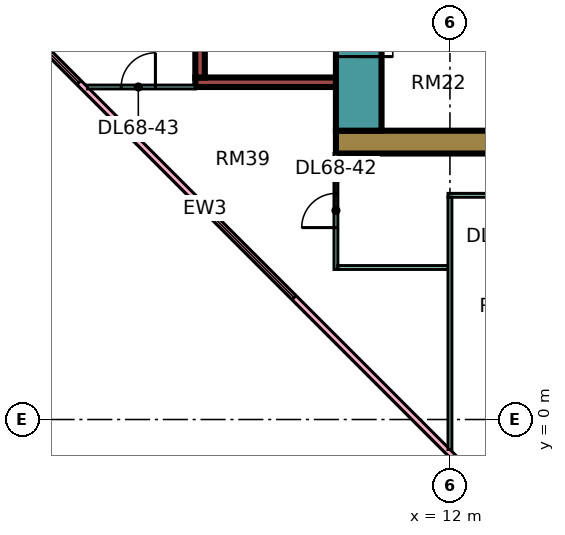
"""IFC4 building model, lengths in metres.
Left out: names, types, materials, properties, quantities, classifications, styles, units other than length and angle.
Written with IfcOpenShell. Run it as: python <this file> out.ifc"""

import sys

from ifc_helpers import new_model, si_unit, direction, frame, frame_2d, origin, place, context, subcontext, project, spatial, rectangle, extrude, element, fill, save


model = new_model("IFC4")
c1 = context("Model", 3, precision=1e-05, world=origin(), true_north=direction((0.0, 1.0)))
c2 = subcontext(c1, "Body", "Model", "MODEL_VIEW")
j1 = project(units=[si_unit("LENGTHUNIT", "METRE"), si_unit("PLANEANGLEUNIT", "RADIAN")], contexts=[c1])
p1 = place(None, origin())
s1 = spatial("IfcSite", under=j1, at=p1, CompositionType="ELEMENT")
p2 = place(p1, origin())
s2 = spatial("IfcBuilding", under=s1, at=p2, CompositionType="ELEMENT")
p3 = place(p2, frame((0.0, 0.0, 292.15)))
s3 = spatial("IfcBuildingStorey", under=s2, at=p3, CompositionType="ELEMENT", Elevation=292.15)
p4 = place(p3, frame((9.0, 7.3, 0.0), z_axis=(0.0, 0.0, 1.0), x_axis=(1.0, 0.0, 0.0)))
e1 = element("IfcWall", 1, at=p4, inside=s3, PredefinedType="SHEAR", context=c2, shape_type="SweptSolid", body=[
    extrude(rectangle(XDim=25.0, YDim=0.6, at=frame_2d((12.5, 0.0))), origin(), (0.0, 0.0, 1.0), 3.75),
])
p5 = place(p3, frame((9.6, 7.6, 0.0), z_axis=(0.0, 0.0, 1.0), x_axis=(0.0, 1.0, 0.0)))
e2 = element("IfcWall", 2, at=p5, inside=s3, PredefinedType="SHEAR", context=c2, shape_type="SweptSolid", body=[
    extrude(rectangle(XDim=11.8, YDim=1.2, at=frame_2d((5.9, 0.0))), origin(), (0.0, 0.0, 1.0), 3.75),
])
p6 = place(p5, frame((4.275, 0.0, 0.0)))
e3 = element("IfcOpeningElement", 3, at=p6, cuts=e2, PredefinedType="OPENING", context=c2, shape_type="SweptSolid", body=[
    extrude(rectangle(XDim=1.1, YDim=2.2, at=frame_2d((0.55, 1.1))), frame((0.0, 0.61, 0.0), z_axis=(0.0, -1.0, 0.0), x_axis=(1.0, 0.0, 0.0)), (0.0, 0.0, 1.0), 1.22),
])
p7 = place(p5, frame((6.775, 0.0, 0.0)))
e4 = element("IfcOpeningElement", 4, at=p7, cuts=e2, PredefinedType="OPENING", context=c2, shape_type="SweptSolid", body=[
    extrude(rectangle(XDim=1.1, YDim=2.2, at=frame_2d((0.55, 1.1))), frame((0.0, 0.61, 0.0), z_axis=(0.0, -1.0, 0.0), x_axis=(1.0, 0.0, 0.0)), (0.0, 0.0, 1.0), 1.22),
])
p8 = place(p5, frame((9.7, 0.0, 0.0)))
e5 = element("IfcOpeningElement", 5, at=p8, cuts=e2, PredefinedType="OPENING", context=c2, shape_type="SweptSolid", body=[
    extrude(rectangle(XDim=1.1, YDim=2.2, at=frame_2d((0.55, 1.1))), frame((0.0, 0.61, 0.0), z_axis=(0.0, -1.0, 0.0), x_axis=(1.0, 0.0, 0.0)), (0.0, 0.0, 1.0), 1.22),
])
p9 = place(p5, frame((1.95, 0.0, 0.0)))
e6 = element("IfcOpeningElement", 6, at=p9, cuts=e2, PredefinedType="OPENING", context=c2, shape_type="SweptSolid", body=[
    extrude(rectangle(XDim=0.9, YDim=2.1, at=frame_2d((0.45, 1.05))), frame((0.0, 0.61, 0.0), z_axis=(0.0, -1.0, 0.0), x_axis=(1.0, 0.0, 0.0)), (0.0, 0.0, 1.0), 1.22),
])
p10 = place(p3, frame((5.3, 8.875, 0.0), z_axis=(0.0, 0.0, 1.0), x_axis=(1.0, 0.0, 0.0)))
e7 = element("IfcWall", 7, at=p10, inside=s3, PredefinedType="SHEAR", context=c2, shape_type="SweptSolid", body=[
    extrude(rectangle(XDim=3.7, YDim=0.25, at=frame_2d((1.85, 0.0))), origin(), (0.0, 0.0, 1.0), 3.75),
])
p11 = place(p3, frame((5.425, 9.0, 0.0), z_axis=(0.0, 0.0, 1.0), x_axis=(0.0, 1.0, 0.0)))
e8 = element("IfcWall", 8, at=p11, inside=s3, PredefinedType="SHEAR", context=c2, shape_type="SweptSolid", body=[
    extrude(rectangle(XDim=4.0, YDim=0.25, at=frame_2d((2.0, 0.0))), origin(), (0.0, 0.0, 1.0), 3.75),
])
p12 = place(p3, frame((-1.447, 12.553, 0.0), z_axis=(0.0, 0.0, 1.0), x_axis=(0.707106781187, -0.707106781187, 0.0)))
e9 = element("IfcWall", 9, at=p12, inside=s3, PredefinedType="SOLIDWALL", context=c2, shape_type="SweptSolid", body=[
    extrude(rectangle(XDim=19.799, YDim=0.15, at=frame_2d((9.899, 0.0))), origin(), (0.0, 0.0, 1.0), 3.35),
])
p13 = place(p12, frame((2.212, 0.0, 0.45)))
e10 = element("IfcOpeningElement", 10, at=p13, cuts=e9, PredefinedType="OPENING", context=c2, shape_type="SweptSolid", body=[
    extrude(rectangle(XDim=3.0, YDim=2.4, at=frame_2d((1.5, 1.2))), frame((0.0, 0.085, 0.0), z_axis=(0.0, -1.0, 0.0), x_axis=(1.0, 0.0, 0.0)), (0.0, 0.0, 1.0), 0.17),
])
p14 = place(p12, frame((10.216, 0.0, 0.45)))
e11 = element("IfcOpeningElement", 11, at=p14, cuts=e9, PredefinedType="OPENING", context=c2, shape_type="SweptSolid", body=[
    extrude(rectangle(XDim=3.0, YDim=2.4, at=frame_2d((1.5, 1.2))), frame((0.0, 0.085, 0.0), z_axis=(0.0, -1.0, 0.0), x_axis=(1.0, 0.0, 0.0)), (0.0, 0.0, 1.0), 0.17),
])
p15 = place(p3, frame((2.461, 8.75, 0.0), z_axis=(0.0, 0.0, 1.0), x_axis=(1.0, 0.0, 0.0)))
e12 = element("IfcWall", 12, at=p15, inside=s3, PredefinedType="PARTITIONING", context=c2, shape_type="SweptSolid", body=[
    extrude(rectangle(XDim=2.839, YDim=0.1, at=frame_2d((1.419, 0.0))), origin(), (0.0, 0.0, 1.0), 3.35),
])
p16 = place(p15, frame((0.889, 0.0, 0.0)))
e13 = element("IfcOpeningElement", 13, at=p16, cuts=e12, PredefinedType="OPENING", context=c2, shape_type="SweptSolid", body=[
    extrude(rectangle(XDim=0.9, YDim=2.1, at=frame_2d((0.45, 1.05))), frame((0.0, 0.06, 0.0), z_axis=(0.0, -1.0, 0.0), x_axis=(1.0, 0.0, 0.0)), (0.0, 0.0, 1.0), 0.12),
])
p17 = place(p3, frame((9.0, 3.95, 0.0), z_axis=(0.0, 0.0, 1.0), x_axis=(0.0, 1.0, 0.0)))
e14 = element("IfcWall", 14, at=p17, inside=s3, PredefinedType="PARTITIONING", context=c2, shape_type="SweptSolid", body=[
    extrude(rectangle(XDim=3.05, YDim=0.1, at=frame_2d((1.525, 0.0))), origin(), (0.0, 0.0, 1.0), 3.35),
])
p18 = place(p17, frame((1.1, 0.0, 0.0)))
e15 = element("IfcOpeningElement", 15, at=p18, cuts=e14, PredefinedType="OPENING", context=c2, shape_type="SweptSolid", body=[
    extrude(rectangle(XDim=0.9, YDim=2.1, at=frame_2d((0.45, 1.05))), frame((0.0, 0.06, 0.0), z_axis=(0.0, -1.0, 0.0), x_axis=(1.0, 0.0, 0.0)), (0.0, 0.0, 1.0), 0.12),
])
p19 = place(p3, frame((9.05, 4.0, 0.0), z_axis=(0.0, 0.0, 1.0), x_axis=(1.0, 0.0, 0.0)))
e16 = element("IfcWall", 16, at=p19, inside=s3, PredefinedType="PARTITIONING", context=c2, shape_type="SweptSolid", body=[
    extrude(rectangle(XDim=2.9, YDim=0.1, at=frame_2d((1.45, 0.0))), origin(), (0.0, 0.0, 1.0), 3.35),
])
p20 = place(p3, frame((11.95, 5.9, 0.0), z_axis=(0.0, 0.0, 1.0), x_axis=(1.0, 0.0, 0.0)))
e17 = element("IfcWall", 17, at=p20, inside=s3, PredefinedType="PARTITIONING", context=c2, shape_type="SweptSolid", body=[
    extrude(rectangle(XDim=21.1, YDim=0.1, at=frame_2d((10.55, 0.0))), origin(), (0.0, 0.0, 1.0), 3.35),
])
p21 = place(p20, frame((1.1, 0.0, 0.0)))
e18 = element("IfcOpeningElement", 18, at=p21, cuts=e17, PredefinedType="OPENING", context=c2, shape_type="SweptSolid", body=[
    extrude(rectangle(XDim=0.9, YDim=2.1, at=frame_2d((0.45, 1.05))), frame((0.0, 0.06, 0.0), z_axis=(0.0, -1.0, 0.0), x_axis=(1.0, 0.0, 0.0)), (0.0, 0.0, 1.0), 0.12),
])
p22 = place(p20, frame((13.1, 0.0, 0.0)))
e19 = element("IfcOpeningElement", 19, at=p22, cuts=e17, PredefinedType="OPENING", context=c2, shape_type="SweptSolid", body=[
    extrude(rectangle(XDim=0.9, YDim=2.1, at=frame_2d((0.45, 1.05))), frame((0.0, 0.06, 0.0), z_axis=(0.0, -1.0, 0.0), x_axis=(1.0, 0.0, 0.0)), (0.0, 0.0, 1.0), 0.12),
])
p23 = place(p20, frame((16.1, 0.0, 0.0)))
e20 = element("IfcOpeningElement", 20, at=p23, cuts=e17, PredefinedType="OPENING", context=c2, shape_type="SweptSolid", body=[
    extrude(rectangle(XDim=0.9, YDim=2.1, at=frame_2d((0.45, 1.05))), frame((0.0, 0.06, 0.0), z_axis=(0.0, -1.0, 0.0), x_axis=(1.0, 0.0, 0.0)), (0.0, 0.0, 1.0), 0.12),
])
p24 = place(p20, frame((7.1, 0.0, 0.0)))
e21 = element("IfcOpeningElement", 21, at=p24, cuts=e17, PredefinedType="OPENING", context=c2, shape_type="SweptSolid", body=[
    extrude(rectangle(XDim=0.9, YDim=2.1, at=frame_2d((0.45, 1.05))), frame((0.0, 0.06, 0.0), z_axis=(0.0, -1.0, 0.0), x_axis=(1.0, 0.0, 0.0)), (0.0, 0.0, 1.0), 0.12),
])
p25 = place(p3, frame((12.0, -0.788, 0.0), z_axis=(0.0, 0.0, 1.0), x_axis=(0.0, 1.0, 0.0)))
e22 = element("IfcWall", 22, at=p25, inside=s3, PredefinedType="PARTITIONING", context=c2, shape_type="SweptSolid", body=[
    extrude(rectangle(XDim=6.638, YDim=0.1, at=frame_2d((3.319, 0.0))), origin(), (0.0, 0.0, 1.0), 3.35),
])
p26 = place(p13, origin())
e23 = element("IfcWindow", 23, at=p26, inside=s3, PartitioningType="SINGLE_PANEL", PredefinedType="WINDOW", context=c2, shape_type="SweptSolid", body=[
    extrude(rectangle(XDim=3.0, YDim=2.4, at=frame_2d((1.5, 1.2))), frame((0.0, 0.03, 0.0), z_axis=(0.0, -1.0, 0.0), x_axis=(1.0, 0.0, 0.0)), (0.0, 0.0, 1.0), 0.06),
])
fill(e10, e23)
p27 = place(p14, origin())
e24 = element("IfcWindow", 24, at=p27, inside=s3, PartitioningType="SINGLE_PANEL", PredefinedType="WINDOW", context=c2, shape_type="SweptSolid", body=[
    extrude(rectangle(XDim=3.0, YDim=2.4, at=frame_2d((1.5, 1.2))), frame((0.0, 0.03, 0.0), z_axis=(0.0, -1.0, 0.0), x_axis=(1.0, 0.0, 0.0)), (0.0, 0.0, 1.0), 0.06),
])
fill(e11, e24)
p28 = place(p9, frame((0.9, 0.0, 0.0), z_axis=(0.0, 0.0, 1.0), x_axis=(-1.0, 0.0, 0.0)))
e25 = element("IfcDoor", 25, at=p28, inside=s3, OperationType="SINGLE_SWING_LEFT", PredefinedType="DOOR", context=c2, shape_type="SweptSolid", body=[
    extrude(rectangle(XDim=0.9, YDim=2.1, at=frame_2d((0.45, 1.05))), frame((0.0, 0.025, 0.0), z_axis=(0.0, -1.0, 0.0), x_axis=(1.0, 0.0, 0.0)), (0.0, 0.0, 1.0), 0.05),
])
fill(e6, e25)
p29 = place(p18, origin())
e26 = element("IfcDoor", 26, at=p29, inside=s3, OperationType="SINGLE_SWING_LEFT", PredefinedType="DOOR", context=c2, shape_type="SweptSolid", body=[
    extrude(rectangle(XDim=0.9, YDim=2.1, at=frame_2d((0.45, 1.05))), frame((0.0, 0.025, 0.0), z_axis=(0.0, -1.0, 0.0), x_axis=(1.0, 0.0, 0.0)), (0.0, 0.0, 1.0), 0.05),
])
fill(e15, e26)
p30 = place(p16, frame((0.9, 0.0, 0.0), z_axis=(0.0, 0.0, 1.0), x_axis=(-1.0, 0.0, 0.0)))
e27 = element("IfcDoor", 27, at=p30, inside=s3, OperationType="SINGLE_SWING_RIGHT", PredefinedType="DOOR", context=c2, shape_type="SweptSolid", body=[
    extrude(rectangle(XDim=0.9, YDim=2.1, at=frame_2d((0.45, 1.05))), frame((0.0, 0.025, 0.0), z_axis=(0.0, -1.0, 0.0), x_axis=(1.0, 0.0, 0.0)), (0.0, 0.0, 1.0), 0.05),
])
fill(e13, e27)
save(model, sys.argv[1])
